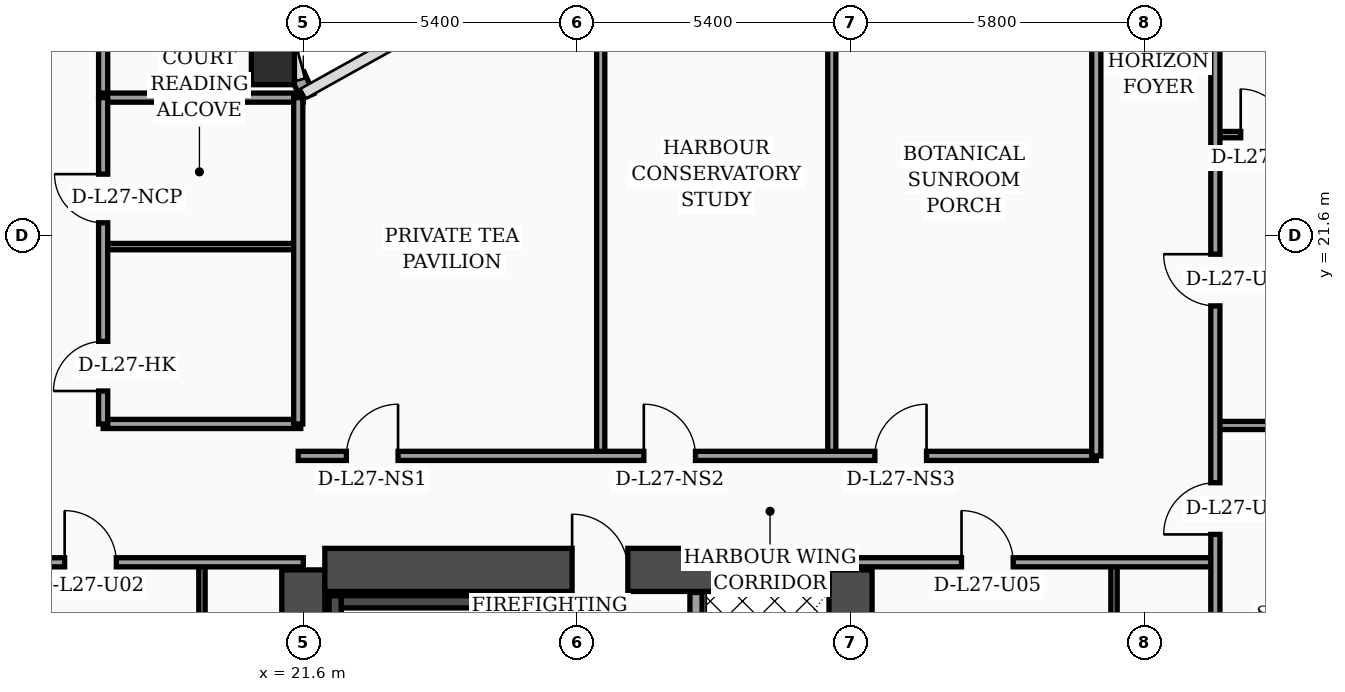
"""IFC4 building model, lengths in metres.
Left out: names, types, materials, properties, quantities, classifications, styles, units other than length and angle.
Written with IfcOpenShell. Run it as: python <this file> out.ifc"""

import sys

from ifc_helpers import new_model, si_unit, direction, frame, frame_2d, origin, origin_2d, place, context, subcontext, project, spatial, rectangle, hollow_rectangle, extrude, element, fill, save


model = new_model("IFC4")
c1 = context("Model", 3, precision=1e-05, world=origin(), true_north=direction((0.0, 1.0)))
c2 = subcontext(c1, "Body", "Model", "MODEL_VIEW")
j1 = project(units=[si_unit("LENGTHUNIT", "METRE"), si_unit("PLANEANGLEUNIT", "RADIAN")], contexts=[c1])
p1 = place(None, origin())
s1 = spatial("IfcSite", under=j1, at=p1, CompositionType="ELEMENT")
p2 = place(p1, origin())
s2 = spatial("IfcBuilding", under=s1, at=p2, CompositionType="ELEMENT")
p3 = place(p2, frame((0.0, 0.0, 112.6)))
s3 = spatial("IfcBuildingStorey", under=s2, at=p3, CompositionType="ELEMENT", Elevation=112.6)
for number, where, z_axis, x_axis in (
    (1, (21.6, 4.6, 0.0), (0.0, 0.0, 1.0), (0.0, 1.0, 0.0)),
    (2, (32.4, 4.6, 0.0), (0.0, 0.0, 1.0), (0.0, 1.0, 0.0)),
):
    element("IfcWall", number, at=place(p3, frame(where, z_axis=z_axis, x_axis=x_axis)), inside=s3, PredefinedType="SHEAR", context=c2, shape_type="SweptSolid", body=[
        extrude(rectangle(XDim=10.4, YDim=0.85, at=frame_2d((5.2, 0.0))), origin(), (0.0, 0.0, 1.0), 3.56),
    ])
p4 = place(p3, frame((22.025, 15.0, 0.0), z_axis=(0.0, 0.0, 1.0), x_axis=(1.0, 0.0, 0.0)))
e3 = element("IfcWall", 3, at=p4, inside=s3, PredefinedType="SHEAR", context=c2, shape_type="SweptSolid", body=[
    extrude(rectangle(XDim=9.95, YDim=0.85, at=frame_2d((4.975, 0.0))), origin(), (0.0, 0.0, 1.0), 3.56),
])
p5 = place(p4, frame((4.88, 0.0, 0.0)))
e4 = element("IfcOpeningElement", 4, at=p5, cuts=e3, PredefinedType="OPENING", context=c2, shape_type="SweptSolid", body=[
    extrude(rectangle(XDim=1.1, YDim=2.2, at=frame_2d((0.55, 1.1))), frame((0.0, 0.435, 0.0), z_axis=(0.0, -1.0, 0.0), x_axis=(1.0, 0.0, 0.0)), (0.0, 0.0, 1.0), 0.87),
])
p6 = place(p3, frame((22.23, 5.025, 0.0), z_axis=(0.0, 0.0, 1.0), x_axis=(0.0, 1.0, 0.0)))
e5 = element("IfcWall", 5, at=p6, inside=s3, PredefinedType="SOLIDWALL", context=c2, shape_type="SweptSolid", body=[
    extrude(rectangle(XDim=9.465, YDim=0.24, at=frame_2d((4.732, 0.0))), origin(), (0.0, 0.0, 1.0), 3.56),
])
p7 = place(p3, frame((25.57, 5.025, 0.0), z_axis=(0.0, 0.0, 1.0), x_axis=(0.0, 1.0, 0.0)))
e6 = element("IfcWall", 6, at=p7, inside=s3, PredefinedType="SOLIDWALL", context=c2, shape_type="SweptSolid", body=[
    extrude(rectangle(XDim=9.465, YDim=0.24, at=frame_2d((4.732, 0.0))), origin(), (0.0, 0.0, 1.0), 3.56),
])
p8 = place(p7, frame((0.35, 0.0, 0.0)))
e7 = element("IfcOpeningElement", 7, at=p8, cuts=e6, PredefinedType="OPENING", context=c2, shape_type="SweptSolid", body=[
    extrude(rectangle(XDim=1.15, YDim=2.2, at=frame_2d((0.575, 1.1))), frame((0.0, 0.13, 0.0), z_axis=(0.0, -1.0, 0.0), x_axis=(1.0, 0.0, 0.0)), (0.0, 0.0, 1.0), 0.26),
])
p9 = place(p3, frame((22.35, 14.37, 0.0), z_axis=(0.0, 0.0, 1.0), x_axis=(1.0, 0.0, 0.0)))
e8 = element("IfcWall", 8, at=p9, inside=s3, PredefinedType="SOLIDWALL", context=c2, shape_type="SweptSolid", body=[
    extrude(rectangle(XDim=3.1, YDim=0.24, at=frame_2d((1.55, 0.0))), origin(), (0.0, 0.0, 1.0), 3.56),
])
p10 = place(p3, frame((21.0, 25.0, 0.0), z_axis=(0.0, 0.0, 1.0), x_axis=(1.0, 0.0, 0.0)))
e9 = element("IfcColumn", 9, at=p10, inside=s3, PredefinedType="COLUMN", context=c2, shape_type="SweptSolid", body=[
    extrude(hollow_rectangle(XDim=0.85, YDim=0.85, WallThickness=0.036, at=origin_2d()), origin(), (0.0, 0.0, 1.0), 3.56),
])
p11 = place(p3, frame((21.68, 24.34, 0.0), z_axis=(0.0, 0.0, 1.0), x_axis=(-0.40758134973, 0.913168901875, 0.0)))
e10 = element("IfcWall", 10, at=p11, inside=s3, PredefinedType="SOLIDWALL", context=c2, shape_type="SweptSolid", body=[
    extrude(rectangle(XDim=0.471, YDim=0.28, at=frame_2d((0.235, 0.0))), origin(), (0.0, 0.0, 1.0), 3.56),
])
p12 = place(p3, frame((29.35, 5.045, 0.0), z_axis=(0.0, 0.0, 1.0), x_axis=(0.0, 1.0, 0.0)))
e11 = element("IfcWall", 11, at=p12, inside=s3, PredefinedType="SOLIDWALL", context=c2, shape_type="SweptSolid", body=[
    extrude(rectangle(XDim=9.51, YDim=0.24, at=frame_2d((4.755, 0.0))), origin(), (0.0, 0.0, 1.0), 3.56),
])
p13 = place(p12, frame((0.55, 0.0, 0.0)))
e12 = element("IfcOpeningElement", 12, at=p13, cuts=e11, PredefinedType="OPENING", context=c2, shape_type="SweptSolid", body=[
    extrude(rectangle(XDim=1.3, YDim=2.35, at=frame_2d((0.65, 1.175))), frame((0.0, 0.13, 0.0), z_axis=(0.0, -1.0, 0.0), x_axis=(1.0, 0.0, 0.0)), (0.0, 0.0, 1.0), 0.26),
])
p14 = place(p3, frame((19.6, 2.44, 0.0), z_axis=(0.0, 0.0, 1.0), x_axis=(0.0, 1.0, 0.0)))
e13 = element("IfcWall", 13, at=p14, inside=s3, PredefinedType="PARTITIONING", context=c2, shape_type="SweptSolid", body=[
    extrude(rectangle(XDim=12.71, YDim=0.125, at=frame_2d((6.355, 0.0))), origin(), (0.0, 0.0, 1.0), 2.49),
])
p15 = place(p14, frame((4.34, 0.0, 0.0)))
e14 = element("IfcOpeningElement", 14, at=p15, cuts=e13, PredefinedType="OPENING", context=c2, shape_type="SweptSolid", body=[
    extrude(rectangle(XDim=0.96, YDim=2.2, at=frame_2d((0.48, 1.1))), frame((0.0, 0.073, 0.0), z_axis=(0.0, -1.0, 0.0), x_axis=(1.0, 0.0, 0.0)), (0.0, 0.0, 1.0), 0.145),
])
p16 = place(p14, frame((10.18, 0.0, 0.0)))
e15 = element("IfcOpeningElement", 15, at=p16, cuts=e13, PredefinedType="OPENING", context=c2, shape_type="SweptSolid", body=[
    extrude(rectangle(XDim=0.9, YDim=2.15, at=frame_2d((0.45, 1.075))), frame((0.0, 0.073, 0.0), z_axis=(0.0, -1.0, 0.0), x_axis=(1.0, 0.0, 0.0)), (0.0, 0.0, 1.0), 0.145),
])
p17 = place(p3, frame((15.15, 15.15, 0.0), z_axis=(0.0, 0.0, 1.0), x_axis=(1.0, 0.0, 0.0)))
e16 = element("IfcWall", 16, at=p17, inside=s3, PredefinedType="PARTITIONING", context=c2, shape_type="SweptSolid", body=[
    extrude(rectangle(XDim=6.45, YDim=0.18, at=frame_2d((3.225, 0.0))), origin(), (0.0, 0.0, 1.0), 2.49),
])
p18 = place(p17, frame((1.74, 0.0, 0.0)))
e17 = element("IfcOpeningElement", 17, at=p18, cuts=e16, PredefinedType="OPENING", context=c2, shape_type="SweptSolid", body=[
    extrude(rectangle(XDim=1.02, YDim=2.2, at=frame_2d((0.51, 1.1))), frame((0.0, 0.1, 0.0), z_axis=(0.0, -1.0, 0.0), x_axis=(1.0, 0.0, 0.0)), (0.0, 0.0, 1.0), 0.2),
])
p19 = place(p3, frame((17.65, 24.3, 0.0), z_axis=(0.0, 0.0, 1.0), x_axis=(0.0, 1.0, 0.0)))
e18 = element("IfcWall", 18, at=p19, inside=s3, PredefinedType="PARTITIONING", context=c2, shape_type="SweptSolid", body=[
    extrude(rectangle(XDim=17.65, YDim=0.18, at=frame_2d((8.825, 0.0))), origin(), (0.0, 0.0, 1.0), 2.84),
])
p20 = place(p3, frame((17.65, 17.88, 0.0), z_axis=(0.0, 0.0, 1.0), x_axis=(1.0, 0.0, 0.0)))
e19 = element("IfcWall", 19, at=p20, inside=s3, PredefinedType="PARTITIONING", context=c2, shape_type="SweptSolid", body=[
    extrude(rectangle(XDim=3.9, YDim=0.18, at=frame_2d((1.95, 0.0))), origin(), (0.0, 0.0, 1.0), 3.56),
])
p21 = place(p3, frame((17.65, 21.38, 0.0), z_axis=(0.0, 0.0, 1.0), x_axis=(1.0, 0.0, 0.0)))
e20 = element("IfcWall", 20, at=p21, inside=s3, PredefinedType="PARTITIONING", context=c2, shape_type="SweptSolid", body=[
    extrude(rectangle(XDim=3.9, YDim=0.125, at=frame_2d((1.95, 0.0))), origin(), (0.0, 0.0, 1.0), 3.09),
])
p22 = place(p3, frame((17.65, 24.32, 0.0), z_axis=(0.0, 0.0, 1.0), x_axis=(1.0, 0.0, 0.0)))
e21 = element("IfcWall", 21, at=p22, inside=s3, PredefinedType="PARTITIONING", context=c2, shape_type="SweptSolid", body=[
    extrude(rectangle(XDim=3.95, YDim=0.18, at=frame_2d((1.975, 0.0))), origin(), (0.0, 0.0, 1.0), 3.56),
])
p23 = place(p3, frame((21.5, 17.88, 0.0), z_axis=(0.0, 0.0, 1.0), x_axis=(0.0, 1.0, 0.0)))
e22 = element("IfcWall", 22, at=p23, inside=s3, PredefinedType="PARTITIONING", context=c2, shape_type="SweptSolid", body=[
    extrude(rectangle(XDim=6.44, YDim=0.18, at=frame_2d((3.22, 0.0))), origin(), (0.0, 0.0, 1.0), 3.09),
])
p24 = place(p3, frame((17.65, 17.88, 0.0), z_axis=(0.0, 0.0, 1.0), x_axis=(0.0, 1.0, 0.0)))
e23 = element("IfcWall", 23, at=p24, inside=s3, PredefinedType="PARTITIONING", context=c2, shape_type="SweptSolid", body=[
    extrude(rectangle(XDim=6.44, YDim=0.18, at=frame_2d((3.22, 0.0))), origin(), (0.0, 0.0, 1.0), 3.09),
])
p25 = place(p24, frame((0.65, 0.0, 0.0)))
e24 = element("IfcOpeningElement", 24, at=p25, cuts=e23, PredefinedType="OPENING", context=c2, shape_type="SweptSolid", body=[
    extrude(rectangle(XDim=0.98, YDim=2.15, at=frame_2d((0.49, 1.075))), frame((0.0, 0.1, 0.0), z_axis=(0.0, -1.0, 0.0), x_axis=(1.0, 0.0, 0.0)), (0.0, 0.0, 1.0), 0.2),
])
p26 = place(p24, frame((3.97, 0.0, 0.0)))
e25 = element("IfcOpeningElement", 25, at=p26, cuts=e23, PredefinedType="OPENING", context=c2, shape_type="SweptSolid", body=[
    extrude(rectangle(XDim=0.96, YDim=2.2, at=frame_2d((0.48, 1.1))), frame((0.0, 0.1, 0.0), z_axis=(0.0, -1.0, 0.0), x_axis=(1.0, 0.0, 0.0)), (0.0, 0.0, 1.0), 0.2),
])
p27 = place(p3, frame((37.6, 2.44, 0.0), z_axis=(0.0, 0.0, 1.0), x_axis=(0.0, 1.0, 0.0)))
e26 = element("IfcWall", 26, at=p27, inside=s3, PredefinedType="PARTITIONING", context=c2, shape_type="SweptSolid", body=[
    extrude(rectangle(XDim=12.71, YDim=0.125, at=frame_2d((6.355, 0.0))), origin(), (0.0, 0.0, 1.0), 2.84),
])
p28 = place(p27, frame((4.35, 0.0, 0.0)))
e27 = element("IfcOpeningElement", 27, at=p28, cuts=e26, PredefinedType="OPENING", context=c2, shape_type="SweptSolid", body=[
    extrude(rectangle(XDim=0.96, YDim=2.2, at=frame_2d((0.48, 1.1))), frame((0.0, 0.073, 0.0), z_axis=(0.0, -1.0, 0.0), x_axis=(1.0, 0.0, 0.0)), (0.0, 0.0, 1.0), 0.145),
])
p29 = place(p27, frame((10.21, 0.0, 0.0)))
e28 = element("IfcOpeningElement", 28, at=p29, cuts=e26, PredefinedType="OPENING", context=c2, shape_type="SweptSolid", body=[
    extrude(rectangle(XDim=0.9, YDim=2.15, at=frame_2d((0.45, 1.075))), frame((0.0, 0.073, 0.0), z_axis=(0.0, -1.0, 0.0), x_axis=(1.0, 0.0, 0.0)), (0.0, 0.0, 1.0), 0.145),
])
p30 = place(p3, frame((32.4, 15.15, 0.0), z_axis=(0.0, 0.0, 1.0), x_axis=(1.0, 0.0, 0.0)))
e29 = element("IfcWall", 29, at=p30, inside=s3, PredefinedType="PARTITIONING", context=c2, shape_type="SweptSolid", body=[
    extrude(rectangle(XDim=7.2, YDim=0.18, at=frame_2d((3.6, 0.0))), origin(), (0.0, 0.0, 1.0), 2.84),
])
p31 = place(p30, frame((2.19, 0.0, 0.0)))
e30 = element("IfcOpeningElement", 30, at=p31, cuts=e29, PredefinedType="OPENING", context=c2, shape_type="SweptSolid", body=[
    extrude(rectangle(XDim=1.02, YDim=2.2, at=frame_2d((0.51, 1.1))), frame((0.0, 0.1, 0.0), z_axis=(0.0, -1.0, 0.0), x_axis=(1.0, 0.0, 0.0)), (0.0, 0.0, 1.0), 0.2),
])
p32 = place(p3, frame((27.47, 17.25, 0.0), z_axis=(0.0, 0.0, 1.0), x_axis=(0.0, 1.0, 0.0)))
e31 = element("IfcWall", 31, at=p32, inside=s3, PredefinedType="PARTITIONING", context=c2, shape_type="SweptSolid", body=[
    extrude(rectangle(XDim=10.5, YDim=0.16, at=frame_2d((5.25, 0.0))), origin(), (0.0, 0.0, 1.0), 2.84),
])
p33 = place(p3, frame((32.03, 17.25, 0.0), z_axis=(0.0, 0.0, 1.0), x_axis=(0.0, 1.0, 0.0)))
e32 = element("IfcWall", 32, at=p33, inside=s3, PredefinedType="PARTITIONING", context=c2, shape_type="SweptSolid", body=[
    extrude(rectangle(XDim=13.04, YDim=0.16, at=frame_2d((6.52, 0.0))), origin(), (0.0, 0.0, 1.0), 2.84),
])
p34 = place(p3, frame((21.5, 17.25, 0.0), z_axis=(0.0, 0.0, 1.0), x_axis=(1.0, 0.0, 0.0)))
e33 = element("IfcWall", 33, at=p34, inside=s3, PredefinedType="PARTITIONING", context=c2, shape_type="SweptSolid", body=[
    extrude(rectangle(XDim=15.75, YDim=0.18, at=frame_2d((7.875, 0.0))), origin(), (0.0, 0.0, 1.0), 2.84),
])
p35 = place(p34, frame((0.95, 0.0, 0.0)))
e34 = element("IfcOpeningElement", 34, at=p35, cuts=e33, PredefinedType="OPENING", context=c2, shape_type="SweptSolid", body=[
    extrude(rectangle(XDim=1.02, YDim=2.2, at=frame_2d((0.51, 1.1))), frame((0.0, 0.1, 0.0), z_axis=(0.0, -1.0, 0.0), x_axis=(1.0, 0.0, 0.0)), (0.0, 0.0, 1.0), 0.2),
])
p36 = place(p34, frame((6.82, 0.0, 0.0)))
e35 = element("IfcOpeningElement", 35, at=p36, cuts=e33, PredefinedType="OPENING", context=c2, shape_type="SweptSolid", body=[
    extrude(rectangle(XDim=1.02, YDim=2.2, at=frame_2d((0.51, 1.1))), frame((0.0, 0.1, 0.0), z_axis=(0.0, -1.0, 0.0), x_axis=(1.0, 0.0, 0.0)), (0.0, 0.0, 1.0), 0.2),
])
p37 = place(p34, frame((11.38, 0.0, 0.0)))
e36 = element("IfcOpeningElement", 36, at=p37, cuts=e33, PredefinedType="OPENING", context=c2, shape_type="SweptSolid", body=[
    extrude(rectangle(XDim=1.02, YDim=2.2, at=frame_2d((0.51, 1.1))), frame((0.0, 0.1, 0.0), z_axis=(0.0, -1.0, 0.0), x_axis=(1.0, 0.0, 0.0)), (0.0, 0.0, 1.0), 0.2),
])
p38 = place(p3, frame((37.25, 17.25, 0.0), z_axis=(0.0, 0.0, 1.0), x_axis=(0.0, 1.0, 0.0)))
e37 = element("IfcWall", 37, at=p38, inside=s3, PredefinedType="PARTITIONING", context=c2, shape_type="SweptSolid", body=[
    extrude(rectangle(XDim=15.95, YDim=0.18, at=frame_2d((7.975, 0.0))), origin(), (0.0, 0.0, 1.0), 2.84),
])
p39 = place(p3, frame((39.6, 23.59, 0.0), z_axis=(0.0, 0.0, 1.0), x_axis=(1.0, 0.0, 0.0)))
e38 = element("IfcWall", 38, at=p39, inside=s3, PredefinedType="PARTITIONING", context=c2, shape_type="SweptSolid", body=[
    extrude(rectangle(XDim=13.87, YDim=0.125, at=frame_2d((6.935, 0.0))), origin(), (0.0, 0.0, 1.0), 2.84),
])
p40 = place(p39, frame((0.5, 0.0, 0.0)))
e39 = element("IfcOpeningElement", 39, at=p40, cuts=e38, PredefinedType="OPENING", context=c2, shape_type="SweptSolid", body=[
    extrude(rectangle(XDim=0.9, YDim=2.15, at=frame_2d((0.45, 1.075))), frame((0.0, 0.073, 0.0), z_axis=(0.0, -1.0, 0.0), x_axis=(1.0, 0.0, 0.0)), (0.0, 0.0, 1.0), 0.145),
])
p41 = place(p39, frame((3.6, 0.0, 0.0)))
e40 = element("IfcOpeningElement", 40, at=p41, cuts=e38, PredefinedType="OPENING", context=c2, shape_type="SweptSolid", body=[
    extrude(rectangle(XDim=0.96, YDim=2.2, at=frame_2d((0.48, 1.1))), frame((0.0, 0.073, 0.0), z_axis=(0.0, -1.0, 0.0), x_axis=(1.0, 0.0, 0.0)), (0.0, 0.0, 1.0), 0.145),
])
p42 = place(p3, frame((39.6, 17.85, 0.0), z_axis=(0.0, 0.0, 1.0), x_axis=(1.0, 0.0, 0.0)))
e41 = element("IfcWall", 41, at=p42, inside=s3, PredefinedType="PARTITIONING", context=c2, shape_type="SweptSolid", body=[
    extrude(rectangle(XDim=15.68, YDim=0.16, at=frame_2d((7.84, 0.0))), origin(), (0.0, 0.0, 1.0), 2.84),
])
p43 = place(p3, frame((39.6, 2.44, 0.0), z_axis=(0.0, 0.0, 1.0), x_axis=(0.0, 1.0, 0.0)))
e42 = element("IfcWall", 42, at=p43, inside=s3, PredefinedType="PARTITIONING", context=c2, shape_type="SweptSolid", body=[
    extrude(rectangle(XDim=31.04, YDim=0.18, at=frame_2d((15.52, 0.0))), origin(), (0.0, 0.0, 1.0), 2.84),
])
p44 = place(p43, frame((13.26, 0.0, 0.0)))
e43 = element("IfcOpeningElement", 43, at=p44, cuts=e42, PredefinedType="OPENING", context=c2, shape_type="SweptSolid", body=[
    extrude(rectangle(XDim=1.02, YDim=2.2, at=frame_2d((0.51, 1.1))), frame((0.0, 0.1, 0.0), z_axis=(0.0, -1.0, 0.0), x_axis=(1.0, 0.0, 0.0)), (0.0, 0.0, 1.0), 0.2),
])
p45 = place(p43, frame((17.77, 0.0, 0.0)))
e44 = element("IfcOpeningElement", 44, at=p45, cuts=e42, PredefinedType="OPENING", context=c2, shape_type="SweptSolid", body=[
    extrude(rectangle(XDim=1.02, YDim=2.2, at=frame_2d((0.51, 1.1))), frame((0.0, 0.1, 0.0), z_axis=(0.0, -1.0, 0.0), x_axis=(1.0, 0.0, 0.0)), (0.0, 0.0, 1.0), 0.2),
])
p46 = place(p43, frame((25.58, 0.0, 0.0)))
e45 = element("IfcOpeningElement", 45, at=p46, cuts=e42, PredefinedType="OPENING", context=c2, shape_type="SweptSolid", body=[
    extrude(rectangle(XDim=1.02, YDim=2.2, at=frame_2d((0.51, 1.1))), frame((0.0, 0.1, 0.0), z_axis=(0.0, -1.0, 0.0), x_axis=(1.0, 0.0, 0.0)), (0.0, 0.0, 1.0), 0.2),
])
p47 = place(p18, origin())
e46 = element("IfcDoor", 46, at=p47, inside=s3, OperationType="SINGLE_SWING_LEFT", PredefinedType="DOOR", context=c2, shape_type="SweptSolid", body=[
    extrude(rectangle(XDim=1.02, YDim=2.2, at=frame_2d((0.51, 1.1))), frame((0.0, 0.025, 0.0), z_axis=(0.0, -1.0, 0.0), x_axis=(1.0, 0.0, 0.0)), (0.0, 0.0, 1.0), 0.05),
])
fill(e17, e46)
p48 = place(p25, origin())
e47 = element("IfcDoor", 47, at=p48, inside=s3, OperationType="SINGLE_SWING_LEFT", PredefinedType="DOOR", context=c2, shape_type="SweptSolid", body=[
    extrude(rectangle(XDim=0.98, YDim=2.15, at=frame_2d((0.49, 1.075))), frame((0.0, 0.025, 0.0), z_axis=(0.0, -1.0, 0.0), x_axis=(1.0, 0.0, 0.0)), (0.0, 0.0, 1.0), 0.05),
])
fill(e24, e47)
p49 = place(p26, origin())
e48 = element("IfcDoor", 48, at=p49, inside=s3, OperationType="SINGLE_SWING_RIGHT", PredefinedType="DOOR", context=c2, shape_type="SweptSolid", body=[
    extrude(rectangle(XDim=0.96, YDim=2.2, at=frame_2d((0.48, 1.1))), frame((0.0, 0.025, 0.0), z_axis=(0.0, -1.0, 0.0), x_axis=(1.0, 0.0, 0.0)), (0.0, 0.0, 1.0), 0.05),
])
fill(e25, e48)
p50 = place(p31, origin())
e49 = element("IfcDoor", 49, at=p50, inside=s3, OperationType="SINGLE_SWING_LEFT", PredefinedType="DOOR", context=c2, shape_type="SweptSolid", body=[
    extrude(rectangle(XDim=1.02, YDim=2.2, at=frame_2d((0.51, 1.1))), frame((0.0, 0.025, 0.0), z_axis=(0.0, -1.0, 0.0), x_axis=(1.0, 0.0, 0.0)), (0.0, 0.0, 1.0), 0.05),
])
fill(e30, e49)
p51 = place(p35, origin())
e50 = element("IfcDoor", 50, at=p51, inside=s3, OperationType="SINGLE_SWING_RIGHT", PredefinedType="DOOR", context=c2, shape_type="SweptSolid", body=[
    extrude(rectangle(XDim=1.02, YDim=2.2, at=frame_2d((0.51, 1.1))), frame((0.0, 0.025, 0.0), z_axis=(0.0, -1.0, 0.0), x_axis=(1.0, 0.0, 0.0)), (0.0, 0.0, 1.0), 0.05),
])
fill(e34, e50)
p52 = place(p36, origin())
e51 = element("IfcDoor", 51, at=p52, inside=s3, OperationType="SINGLE_SWING_LEFT", PredefinedType="DOOR", context=c2, shape_type="SweptSolid", body=[
    extrude(rectangle(XDim=1.02, YDim=2.2, at=frame_2d((0.51, 1.1))), frame((0.0, 0.025, 0.0), z_axis=(0.0, -1.0, 0.0), x_axis=(1.0, 0.0, 0.0)), (0.0, 0.0, 1.0), 0.05),
])
fill(e35, e51)
p53 = place(p37, origin())
e52 = element("IfcDoor", 52, at=p53, inside=s3, OperationType="SINGLE_SWING_RIGHT", PredefinedType="DOOR", context=c2, shape_type="SweptSolid", body=[
    extrude(rectangle(XDim=1.02, YDim=2.2, at=frame_2d((0.51, 1.1))), frame((0.0, 0.025, 0.0), z_axis=(0.0, -1.0, 0.0), x_axis=(1.0, 0.0, 0.0)), (0.0, 0.0, 1.0), 0.05),
])
fill(e36, e52)
p54 = place(p40, origin())
e53 = element("IfcDoor", 53, at=p54, inside=s3, OperationType="SINGLE_SWING_LEFT", PredefinedType="DOOR", context=c2, shape_type="SweptSolid", body=[
    extrude(rectangle(XDim=0.9, YDim=2.15, at=frame_2d((0.45, 1.075))), frame((0.0, 0.025, 0.0), z_axis=(0.0, -1.0, 0.0), x_axis=(1.0, 0.0, 0.0)), (0.0, 0.0, 1.0), 0.05),
])
fill(e39, e53)
p55 = place(p44, origin())
e54 = element("IfcDoor", 54, at=p55, inside=s3, OperationType="SINGLE_SWING_LEFT", PredefinedType="DOOR", context=c2, shape_type="SweptSolid", body=[
    extrude(rectangle(XDim=1.02, YDim=2.2, at=frame_2d((0.51, 1.1))), frame((0.0, 0.025, 0.0), z_axis=(0.0, -1.0, 0.0), x_axis=(1.0, 0.0, 0.0)), (0.0, 0.0, 1.0), 0.05),
])
fill(e43, e54)
p56 = place(p45, origin())
e55 = element("IfcDoor", 55, at=p56, inside=s3, OperationType="SINGLE_SWING_RIGHT", PredefinedType="DOOR", context=c2, shape_type="SweptSolid", body=[
    extrude(rectangle(XDim=1.02, YDim=2.2, at=frame_2d((0.51, 1.1))), frame((0.0, 0.025, 0.0), z_axis=(0.0, -1.0, 0.0), x_axis=(1.0, 0.0, 0.0)), (0.0, 0.0, 1.0), 0.05),
])
fill(e44, e55)
p57 = place(p5, origin())
e56 = element("IfcDoor", 56, at=p57, inside=s3, OperationType="SINGLE_SWING_LEFT", PredefinedType="DOOR", context=c2, shape_type="SweptSolid", body=[
    extrude(rectangle(XDim=1.1, YDim=2.2, at=frame_2d((0.55, 1.1))), frame((0.0, 0.025, 0.0), z_axis=(0.0, -1.0, 0.0), x_axis=(1.0, 0.0, 0.0)), (0.0, 0.0, 1.0), 0.05),
])
fill(e4, e56)
save(model, sys.argv[1])
